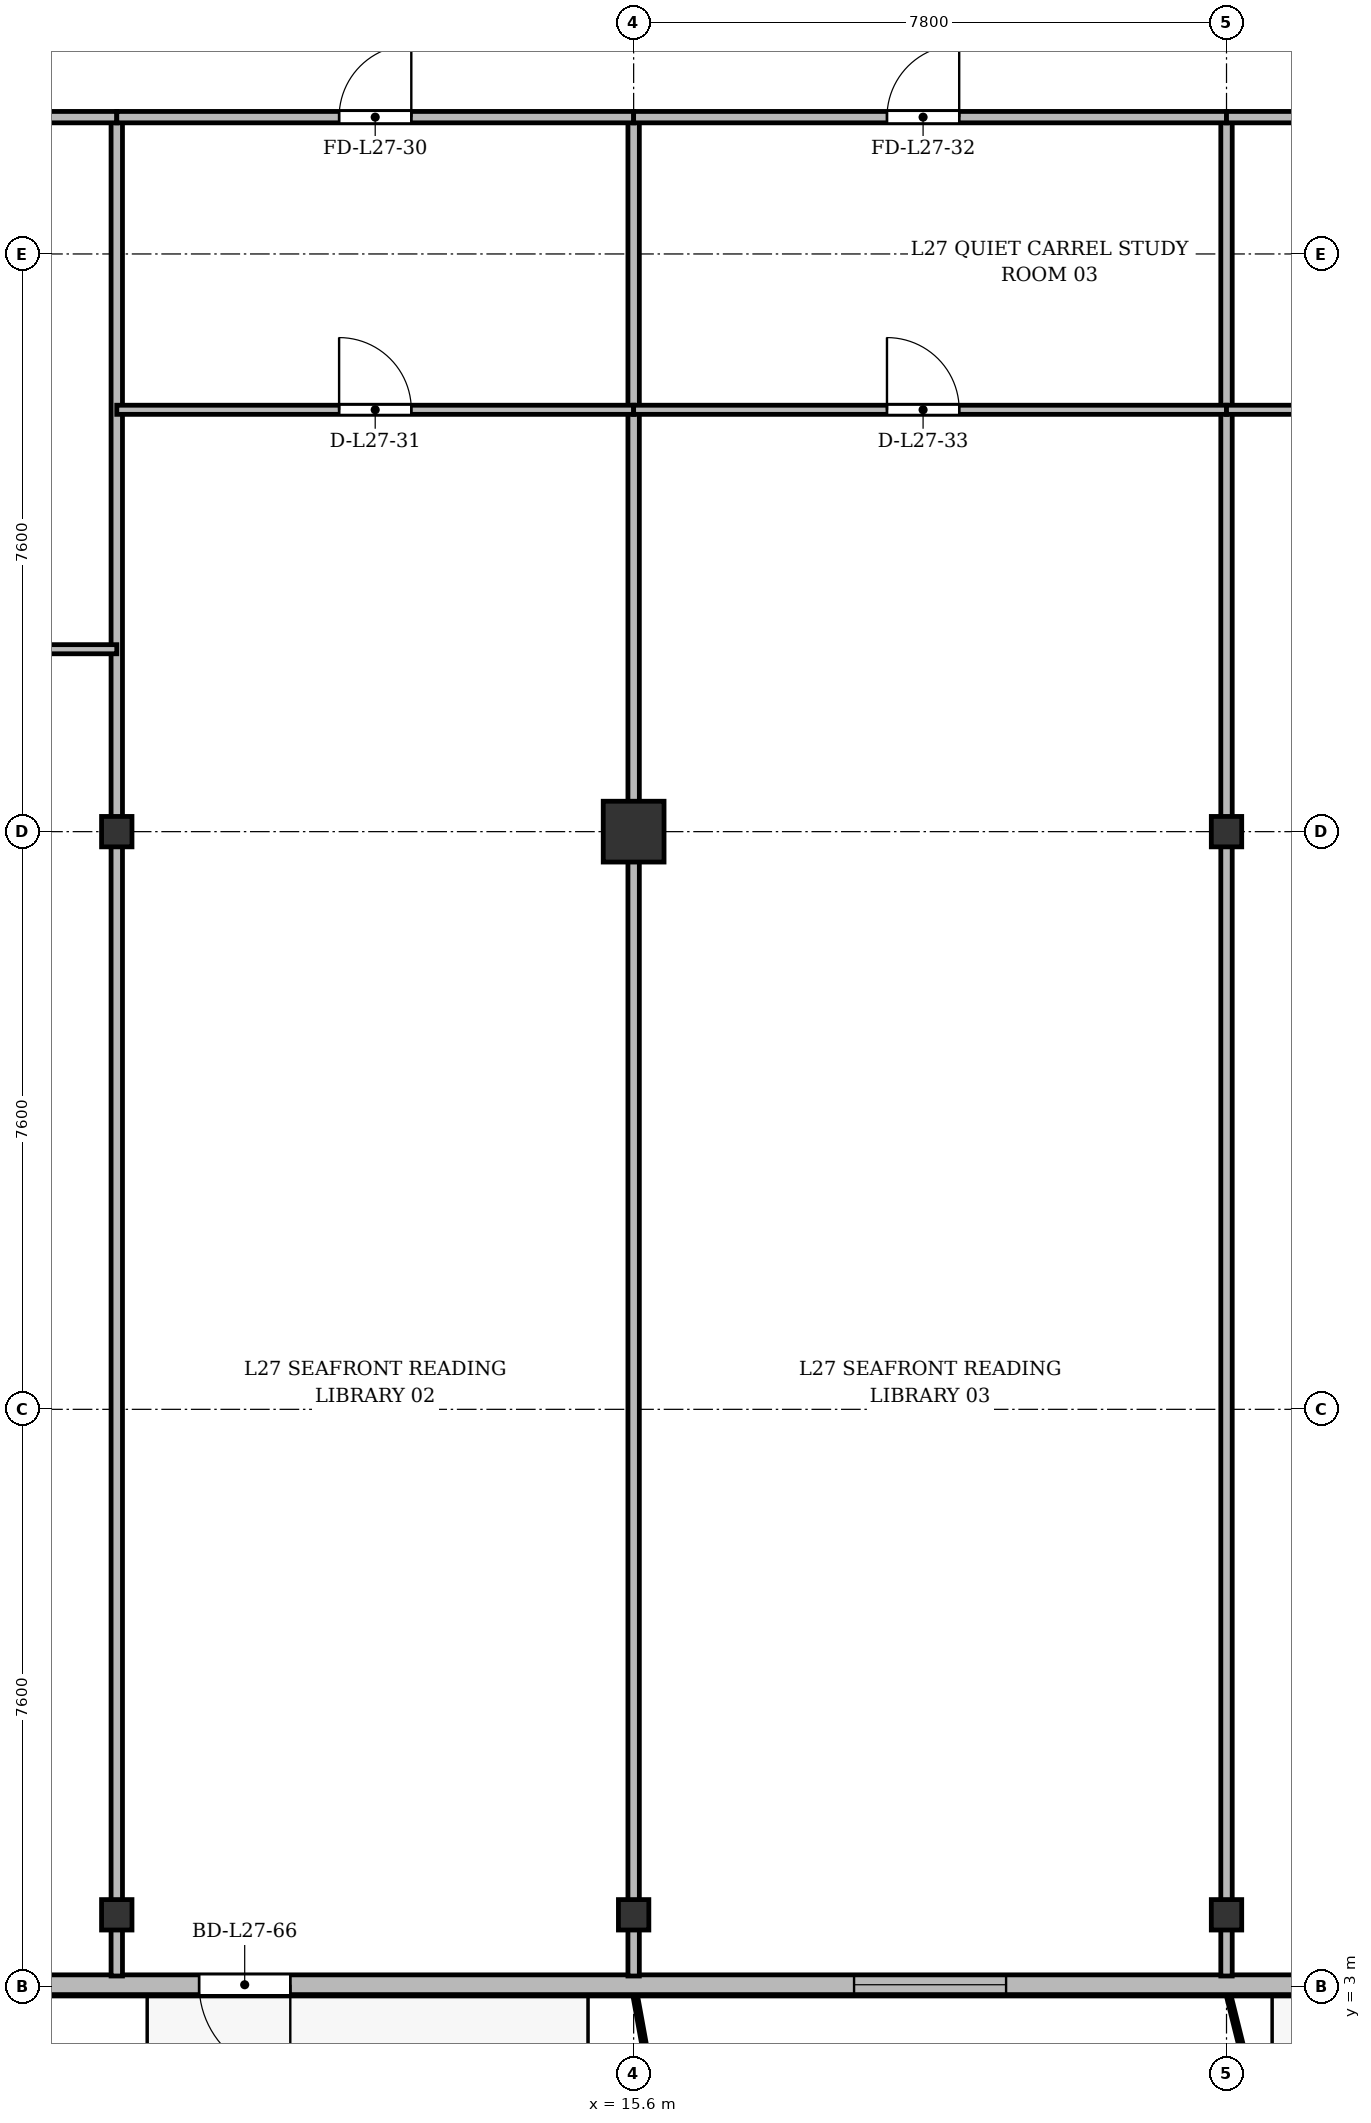
"""IFC4 building model, lengths in metres.
Left out: names, types, materials, properties, quantities, classifications, styles, units other than length and angle.
Written with IfcOpenShell. Run it as: python <this file> out.ifc"""

import sys

from ifc_helpers import new_model, si_unit, direction, frame, frame_2d, origin, origin_2d, place, context, subcontext, project, spatial, rectangle, i_section, extrude, source, transform, mapped, element, fill, save


model = new_model("IFC4")
c1 = context("Model", 3, precision=1e-05, world=origin(), true_north=direction((0.0, 1.0)))
c2 = subcontext(c1, "Body", "Model", "MODEL_VIEW")
j1 = project(units=[si_unit("LENGTHUNIT", "METRE"), si_unit("PLANEANGLEUNIT", "RADIAN")], contexts=[c1])
p1 = place(None, origin())
s1 = spatial("IfcSite", under=j1, at=p1, CompositionType="ELEMENT")
p2 = place(p1, origin())
s2 = spatial("IfcBuilding", under=s1, at=p2, CompositionType="ELEMENT")
p3 = place(p2, frame((0.0, 0.0, 106.9)))
s3 = spatial("IfcBuildingStorey", under=s2, at=p3, CompositionType="ELEMENT", Elevation=106.9)
m1 = source(origin(), c2, "Body", "SweptSolid", [
    extrude(i_section(OverallWidth=0.4, OverallDepth=0.4, WebThickness=0.022, FlangeThickness=0.035, at=origin_2d()), origin(), (0.0, 0.0, 1.0), 3.6),
])
for number, where, z_axis, x_axis in (
    (1, (8.8, 3.95, 0.0), (0.0, 0.0, 1.0), (1.0, 0.0, 0.0)),
    (2, (8.8, 18.2, 0.0), (0.0, 0.0, 1.0), (1.0, 0.0, 0.0)),
    (3, (15.6, 3.95, 0.0), (0.0, 0.0, 1.0), (1.0, 0.0, 0.0)),
):
    element("IfcColumn", number, at=place(p3, frame(where, z_axis=z_axis, x_axis=x_axis)), inside=s3, PredefinedType="COLUMN", context=c2, shape_type="MappedRepresentation", body=[
        mapped(m1, transform((0.0, 0.0, 0.0), x_axis=(1.0, 0.0, 0.0), y_axis=(0.0, 1.0, 0.0), z_axis=(0.0, 0.0, 1.0), scale=1.0)),
    ])
m2 = source(origin(), c2, "Body", "SweptSolid", [
    extrude(rectangle(XDim=0.8, YDim=0.8, at=origin_2d()), origin(), (0.0, 0.0, 1.0), 3.6),
])
p4 = place(p3, frame((15.6, 18.2, 0.0), z_axis=(0.0, 0.0, 1.0), x_axis=(1.0, 0.0, 0.0)))
e4 = element("IfcColumn", 4, at=p4, inside=s3, PredefinedType="COLUMN", context=c2, shape_type="MappedRepresentation", body=[
    mapped(m2, transform((0.0, 0.0, 0.0), x_axis=(1.0, 0.0, 0.0), y_axis=(0.0, 1.0, 0.0), z_axis=(0.0, 0.0, 1.0), scale=1.0)),
])
for number, where, z_axis, x_axis in (
    (5, (23.4, 3.95, 0.0), (0.0, 0.0, 1.0), (1.0, 0.0, 0.0)),
    (6, (23.4, 18.2, 0.0), (0.0, 0.0, 1.0), (1.0, 0.0, 0.0)),
):
    element("IfcColumn", number, at=place(p3, frame(where, z_axis=z_axis, x_axis=x_axis)), inside=s3, PredefinedType="COLUMN", context=c2, shape_type="MappedRepresentation", body=[
        mapped(m1, transform((0.0, 0.0, 0.0), x_axis=(1.0, 0.0, 0.0), y_axis=(0.0, 1.0, 0.0), z_axis=(0.0, 0.0, 1.0), scale=1.0)),
    ])
p5 = place(p3, frame((66.9, 3.03, 0.0), z_axis=(0.0, 0.0, 1.0), x_axis=(-1.0, 0.0, 0.0)))
e7 = element("IfcWall", 7, at=p5, inside=s3, PredefinedType="SOLIDWALL", context=c2, shape_type="SweptSolid", body=[
    extrude(rectangle(XDim=59.4, YDim=0.26, at=frame_2d((29.7, 0.0))), origin(), (0.0, 0.0, 1.0), 3.34),
])
p6 = place(p5, frame((2.0, 0.0, 0.9)))
e8 = element("IfcOpeningElement", 8, at=p6, cuts=e7, PredefinedType="OPENING", context=c2, shape_type="SweptSolid", body=[
    extrude(rectangle(XDim=2.0, YDim=1.95, at=frame_2d((1.0, 0.975))), frame((0.0, 0.14, 0.0), z_axis=(0.0, -1.0, 0.0), x_axis=(1.0, 0.0, 0.0)), (0.0, 0.0, 1.0), 0.28),
])
p7 = place(p5, frame((5.575, 0.0, 0.9)))
e9 = element("IfcOpeningElement", 9, at=p7, cuts=e7, PredefinedType="OPENING", context=c2, shape_type="SweptSolid", body=[
    extrude(rectangle(XDim=1.65, YDim=1.85, at=frame_2d((0.825, 0.925))), frame((0.0, 0.14, 0.0), z_axis=(0.0, -1.0, 0.0), x_axis=(1.0, 0.0, 0.0)), (0.0, 0.0, 1.0), 0.28),
])
p8 = place(p5, frame((9.213, 0.0, 0.0)))
e10 = element("IfcOpeningElement", 10, at=p8, cuts=e7, PredefinedType="OPENING", context=c2, shape_type="SweptSolid", body=[
    extrude(rectangle(XDim=1.2, YDim=2.2, at=frame_2d((0.6, 1.1))), frame((0.0, 0.14, 0.0), z_axis=(0.0, -1.0, 0.0), x_axis=(1.0, 0.0, 0.0)), (0.0, 0.0, 1.0), 0.28),
])
p9 = place(p5, frame((12.8, 0.0, 0.9)))
e11 = element("IfcOpeningElement", 11, at=p9, cuts=e7, PredefinedType="OPENING", context=c2, shape_type="SweptSolid", body=[
    extrude(rectangle(XDim=2.2, YDim=1.8, at=frame_2d((1.1, 0.9))), frame((0.0, 0.14, 0.0), z_axis=(0.0, -1.0, 0.0), x_axis=(1.0, 0.0, 0.0)), (0.0, 0.0, 1.0), 0.28),
])
p10 = place(p5, frame((16.95, 0.0, 0.9)))
e12 = element("IfcOpeningElement", 12, at=p10, cuts=e7, PredefinedType="OPENING", context=c2, shape_type="SweptSolid", body=[
    extrude(rectangle(XDim=1.5, YDim=1.75, at=frame_2d((0.75, 0.875))), frame((0.0, 0.14, 0.0), z_axis=(0.0, -1.0, 0.0), x_axis=(1.0, 0.0, 0.0)), (0.0, 0.0, 1.0), 0.28),
])
p11 = place(p5, frame((20.3, 0.0, 0.9)))
e13 = element("IfcOpeningElement", 13, at=p11, cuts=e7, PredefinedType="OPENING", context=c2, shape_type="SweptSolid", body=[
    extrude(rectangle(XDim=2.0, YDim=1.95, at=frame_2d((1.0, 0.975))), frame((0.0, 0.14, 0.0), z_axis=(0.0, -1.0, 0.0), x_axis=(1.0, 0.0, 0.0)), (0.0, 0.0, 1.0), 0.28),
])
p12 = place(p5, frame((25.575, 0.0, 0.9)))
e14 = element("IfcOpeningElement", 14, at=p12, cuts=e7, PredefinedType="OPENING", context=c2, shape_type="SweptSolid", body=[
    extrude(rectangle(XDim=1.65, YDim=1.85, at=frame_2d((0.825, 0.925))), frame((0.0, 0.14, 0.0), z_axis=(0.0, -1.0, 0.0), x_axis=(1.0, 0.0, 0.0)), (0.0, 0.0, 1.0), 0.28),
])
p13 = place(p5, frame((32.1, 0.0, 0.9)))
e15 = element("IfcOpeningElement", 15, at=p13, cuts=e7, PredefinedType="OPENING", context=c2, shape_type="SweptSolid", body=[
    extrude(rectangle(XDim=1.8, YDim=1.8, at=frame_2d((0.9, 0.9))), frame((0.0, 0.14, 0.0), z_axis=(0.0, -1.0, 0.0), x_axis=(1.0, 0.0, 0.0)), (0.0, 0.0, 1.0), 0.28),
])
p14 = place(p5, frame((37.584, 0.0, 0.0)))
e16 = element("IfcOpeningElement", 16, at=p14, cuts=e7, PredefinedType="OPENING", context=c2, shape_type="SweptSolid", body=[
    extrude(rectangle(XDim=1.2, YDim=2.2, at=frame_2d((0.6, 1.1))), frame((0.0, 0.14, 0.0), z_axis=(0.0, -1.0, 0.0), x_axis=(1.0, 0.0, 0.0)), (0.0, 0.0, 1.0), 0.28),
])
p15 = place(p5, frame((40.85, 0.0, 0.9)))
e17 = element("IfcOpeningElement", 17, at=p15, cuts=e7, PredefinedType="OPENING", context=c2, shape_type="SweptSolid", body=[
    extrude(rectangle(XDim=1.5, YDim=1.75, at=frame_2d((0.75, 0.875))), frame((0.0, 0.14, 0.0), z_axis=(0.0, -1.0, 0.0), x_axis=(1.0, 0.0, 0.0)), (0.0, 0.0, 1.0), 0.28),
])
p16 = place(p5, frame((46.4, 0.0, 0.9)))
e18 = element("IfcOpeningElement", 18, at=p16, cuts=e7, PredefinedType="OPENING", context=c2, shape_type="SweptSolid", body=[
    extrude(rectangle(XDim=2.0, YDim=1.95, at=frame_2d((1.0, 0.975))), frame((0.0, 0.14, 0.0), z_axis=(0.0, -1.0, 0.0), x_axis=(1.0, 0.0, 0.0)), (0.0, 0.0, 1.0), 0.28),
])
p17 = place(p5, frame((55.817, 0.0, 0.0)))
e19 = element("IfcOpeningElement", 19, at=p17, cuts=e7, PredefinedType="OPENING", context=c2, shape_type="SweptSolid", body=[
    extrude(rectangle(XDim=1.2, YDim=2.2, at=frame_2d((0.6, 1.1))), frame((0.0, 0.14, 0.0), z_axis=(0.0, -1.0, 0.0), x_axis=(1.0, 0.0, 0.0)), (0.0, 0.0, 1.0), 0.28),
])
for number, where, z_axis, x_axis in (
    (20, (8.8, 3.145, 0.0), (0.0, 0.0, 1.0), (0.0, 1.0, 0.0)),
    (21, (15.6, 3.145, 0.0), (0.0, 0.0, 1.0), (0.0, 1.0, 0.0)),
    (22, (23.4, 3.145, 0.0), (0.0, 0.0, 1.0), (0.0, 1.0, 0.0)),
):
    element("IfcWall", number, at=place(p3, frame(where, z_axis=z_axis, x_axis=x_axis)), inside=s3, PredefinedType="PARTITIONING", context=c2, shape_type="SweptSolid", body=[
        extrude(rectangle(XDim=24.455, YDim=0.15, at=frame_2d((12.228, 0.0))), origin(), (0.0, 0.0, 1.0), 2.84),
    ])
p18 = place(p3, frame((4.745, 27.6, 0.0), z_axis=(0.0, 0.0, 1.0), x_axis=(1.0, 0.0, 0.0)))
e23 = element("IfcWall", 23, at=p18, inside=s3, PredefinedType="PARTITIONING", context=c2, shape_type="SweptSolid", body=[
    extrude(rectangle(XDim=4.055, YDim=0.15, at=frame_2d((2.027, 0.0))), origin(), (0.0, 0.0, 1.0), 2.84),
])
p19 = place(p18, frame((1.462, 0.0, 0.0)))
e24 = element("IfcOpeningElement", 24, at=p19, cuts=e23, PredefinedType="OPENING", context=c2, shape_type="SweptSolid", body=[
    extrude(rectangle(XDim=0.95, YDim=2.15, at=frame_2d((0.475, 1.075))), frame((0.0, 0.085, 0.0), z_axis=(0.0, -1.0, 0.0), x_axis=(1.0, 0.0, 0.0)), (0.0, 0.0, 1.0), 0.17),
])
p20 = place(p3, frame((4.745, 20.6, 0.0), z_axis=(0.0, 0.0, 1.0), x_axis=(1.0, 0.0, 0.0)))
e25 = element("IfcWall", 25, at=p20, inside=s3, PredefinedType="PARTITIONING", context=c2, shape_type="SweptSolid", body=[
    extrude(rectangle(XDim=4.055, YDim=0.12, at=frame_2d((2.027, 0.0))), origin(), (0.0, 0.0, 1.0), 2.84),
])
p21 = place(p20, frame((1.462, 0.0, 0.0)))
e26 = element("IfcOpeningElement", 26, at=p21, cuts=e25, PredefinedType="OPENING", context=c2, shape_type="SweptSolid", body=[
    extrude(rectangle(XDim=0.95, YDim=2.15, at=frame_2d((0.475, 1.075))), frame((0.0, 0.07, 0.0), z_axis=(0.0, -1.0, 0.0), x_axis=(1.0, 0.0, 0.0)), (0.0, 0.0, 1.0), 0.14),
])
p22 = place(p3, frame((8.8, 27.6, 0.0), z_axis=(0.0, 0.0, 1.0), x_axis=(1.0, 0.0, 0.0)))
e27 = element("IfcWall", 27, at=p22, inside=s3, PredefinedType="PARTITIONING", context=c2, shape_type="SweptSolid", body=[
    extrude(rectangle(XDim=6.8, YDim=0.15, at=frame_2d((3.4, 0.0))), origin(), (0.0, 0.0, 1.0), 2.84),
])
p23 = place(p22, frame((2.925, 0.0, 0.0)))
e28 = element("IfcOpeningElement", 28, at=p23, cuts=e27, PredefinedType="OPENING", context=c2, shape_type="SweptSolid", body=[
    extrude(rectangle(XDim=0.95, YDim=2.15, at=frame_2d((0.475, 1.075))), frame((0.0, 0.085, 0.0), z_axis=(0.0, -1.0, 0.0), x_axis=(1.0, 0.0, 0.0)), (0.0, 0.0, 1.0), 0.17),
])
p24 = place(p3, frame((8.8, 23.75, 0.0), z_axis=(0.0, 0.0, 1.0), x_axis=(1.0, 0.0, 0.0)))
e29 = element("IfcWall", 29, at=p24, inside=s3, PredefinedType="PARTITIONING", context=c2, shape_type="SweptSolid", body=[
    extrude(rectangle(XDim=6.8, YDim=0.12, at=frame_2d((3.4, 0.0))), origin(), (0.0, 0.0, 1.0), 2.84),
])
p25 = place(p24, frame((2.925, 0.0, 0.0)))
e30 = element("IfcOpeningElement", 30, at=p25, cuts=e29, PredefinedType="OPENING", context=c2, shape_type="SweptSolid", body=[
    extrude(rectangle(XDim=0.95, YDim=2.15, at=frame_2d((0.475, 1.075))), frame((0.0, 0.07, 0.0), z_axis=(0.0, -1.0, 0.0), x_axis=(1.0, 0.0, 0.0)), (0.0, 0.0, 1.0), 0.14),
])
p26 = place(p3, frame((15.6, 27.6, 0.0), z_axis=(0.0, 0.0, 1.0), x_axis=(1.0, 0.0, 0.0)))
e31 = element("IfcWall", 31, at=p26, inside=s3, PredefinedType="PARTITIONING", context=c2, shape_type="SweptSolid", body=[
    extrude(rectangle(XDim=7.8, YDim=0.15, at=frame_2d((3.9, 0.0))), origin(), (0.0, 0.0, 1.0), 2.84),
])
p27 = place(p26, frame((3.333, 0.0, 0.0)))
e32 = element("IfcOpeningElement", 32, at=p27, cuts=e31, PredefinedType="OPENING", context=c2, shape_type="SweptSolid", body=[
    extrude(rectangle(XDim=0.95, YDim=2.15, at=frame_2d((0.475, 1.075))), frame((0.0, 0.085, 0.0), z_axis=(0.0, -1.0, 0.0), x_axis=(1.0, 0.0, 0.0)), (0.0, 0.0, 1.0), 0.17),
])
p28 = place(p3, frame((15.6, 23.75, 0.0), z_axis=(0.0, 0.0, 1.0), x_axis=(1.0, 0.0, 0.0)))
e33 = element("IfcWall", 33, at=p28, inside=s3, PredefinedType="PARTITIONING", context=c2, shape_type="SweptSolid", body=[
    extrude(rectangle(XDim=7.8, YDim=0.12, at=frame_2d((3.9, 0.0))), origin(), (0.0, 0.0, 1.0), 2.84),
])
p29 = place(p28, frame((3.333, 0.0, 0.0)))
e34 = element("IfcOpeningElement", 34, at=p29, cuts=e33, PredefinedType="OPENING", context=c2, shape_type="SweptSolid", body=[
    extrude(rectangle(XDim=0.95, YDim=2.15, at=frame_2d((0.475, 1.075))), frame((0.0, 0.07, 0.0), z_axis=(0.0, -1.0, 0.0), x_axis=(1.0, 0.0, 0.0)), (0.0, 0.0, 1.0), 0.14),
])
p30 = place(p3, frame((23.4, 27.6, 0.0), z_axis=(0.0, 0.0, 1.0), x_axis=(1.0, 0.0, 0.0)))
e35 = element("IfcWall", 35, at=p30, inside=s3, PredefinedType="PARTITIONING", context=c2, shape_type="SweptSolid", body=[
    extrude(rectangle(XDim=3.8, YDim=0.15, at=frame_2d((1.9, 0.0))), origin(), (0.0, 0.0, 1.0), 2.84),
])
p31 = place(p30, frame((1.33, 0.0, 0.0)))
e36 = element("IfcOpeningElement", 36, at=p31, cuts=e35, PredefinedType="OPENING", context=c2, shape_type="SweptSolid", body=[
    extrude(rectangle(XDim=0.95, YDim=2.15, at=frame_2d((0.475, 1.075))), frame((0.0, 0.085, 0.0), z_axis=(0.0, -1.0, 0.0), x_axis=(1.0, 0.0, 0.0)), (0.0, 0.0, 1.0), 0.17),
])
p32 = place(p3, frame((23.4, 23.75, 0.0), z_axis=(0.0, 0.0, 1.0), x_axis=(1.0, 0.0, 0.0)))
e37 = element("IfcWall", 37, at=p32, inside=s3, PredefinedType="PARTITIONING", context=c2, shape_type="SweptSolid", body=[
    extrude(rectangle(XDim=3.8, YDim=0.12, at=frame_2d((1.9, 0.0))), origin(), (0.0, 0.0, 1.0), 2.84),
])
p33 = place(p32, frame((1.33, 0.0, 0.0)))
e38 = element("IfcOpeningElement", 38, at=p33, cuts=e37, PredefinedType="OPENING", context=c2, shape_type="SweptSolid", body=[
    extrude(rectangle(XDim=0.95, YDim=2.15, at=frame_2d((0.475, 1.075))), frame((0.0, 0.07, 0.0), z_axis=(0.0, -1.0, 0.0), x_axis=(1.0, 0.0, 0.0)), (0.0, 0.0, 1.0), 0.14),
])
m3 = source(origin(), c2, "Body", "SweptSolid", [
    extrude(rectangle(XDim=2.0, YDim=1.95, at=frame_2d((1.0, 0.975))), frame((0.0, 0.03, 0.0), z_axis=(0.0, -1.0, 0.0), x_axis=(1.0, 0.0, 0.0)), (0.0, 0.0, 1.0), 0.06),
])
p34 = place(p16, origin())
e39 = element("IfcWindow", 39, at=p34, inside=s3, PartitioningType="SINGLE_PANEL", PredefinedType="WINDOW", context=c2, shape_type="MappedRepresentation", body=[
    mapped(m3, transform((0.0, 0.0, 0.0), x_axis=(1.0, 0.0, 0.0), y_axis=(0.0, 1.0, 0.0), z_axis=(0.0, 0.0, 1.0), scale=1.0)),
])
fill(e18, e39)
m4 = source(origin(), c2, "Body", "SweptSolid", [
    extrude(rectangle(XDim=1.2, YDim=2.2, at=frame_2d((0.6, 1.1))), frame((0.0, 0.025, 0.0), z_axis=(0.0, -1.0, 0.0), x_axis=(1.0, 0.0, 0.0)), (0.0, 0.0, 1.0), 0.05),
])
p35 = place(p17, origin())
e40 = element("IfcDoor", 40, at=p35, inside=s3, OperationType="SINGLE_SWING_LEFT", PredefinedType="DOOR", context=c2, shape_type="MappedRepresentation", body=[
    mapped(m4, transform((0.0, 0.0, 0.0), x_axis=(1.0, 0.0, 0.0), y_axis=(0.0, 1.0, 0.0), z_axis=(0.0, 0.0, 1.0), scale=1.0)),
])
fill(e19, e40)
m5 = source(origin(), c2, "Body", "SweptSolid", [
    extrude(rectangle(XDim=0.95, YDim=2.15, at=frame_2d((0.475, 1.075))), frame((0.0, 0.025, 0.0), z_axis=(0.0, -1.0, 0.0), x_axis=(1.0, 0.0, 0.0)), (0.0, 0.0, 1.0), 0.05),
])
p36 = place(p23, origin())
e41 = element("IfcDoor", 41, at=p36, inside=s3, OperationType="SINGLE_SWING_RIGHT", PredefinedType="DOOR", context=c2, shape_type="MappedRepresentation", body=[
    mapped(m5, transform((0.0, 0.0, 0.0), x_axis=(1.0, 0.0, 0.0), y_axis=(0.0, 1.0, 0.0), z_axis=(0.0, 0.0, 1.0), scale=1.0)),
])
fill(e28, e41)
p37 = place(p25, origin())
e42 = element("IfcDoor", 42, at=p37, inside=s3, OperationType="SINGLE_SWING_LEFT", PredefinedType="DOOR", context=c2, shape_type="MappedRepresentation", body=[
    mapped(m5, transform((0.0, 0.0, 0.0), x_axis=(1.0, 0.0, 0.0), y_axis=(0.0, 1.0, 0.0), z_axis=(0.0, 0.0, 1.0), scale=1.0)),
])
fill(e30, e42)
p38 = place(p27, origin())
e43 = element("IfcDoor", 43, at=p38, inside=s3, OperationType="SINGLE_SWING_RIGHT", PredefinedType="DOOR", context=c2, shape_type="MappedRepresentation", body=[
    mapped(m5, transform((0.0, 0.0, 0.0), x_axis=(1.0, 0.0, 0.0), y_axis=(0.0, 1.0, 0.0), z_axis=(0.0, 0.0, 1.0), scale=1.0)),
])
fill(e32, e43)
p39 = place(p29, origin())
e44 = element("IfcDoor", 44, at=p39, inside=s3, OperationType="SINGLE_SWING_LEFT", PredefinedType="DOOR", context=c2, shape_type="MappedRepresentation", body=[
    mapped(m5, transform((0.0, 0.0, 0.0), x_axis=(1.0, 0.0, 0.0), y_axis=(0.0, 1.0, 0.0), z_axis=(0.0, 0.0, 1.0), scale=1.0)),
])
fill(e34, e44)
save(model, sys.argv[1])
